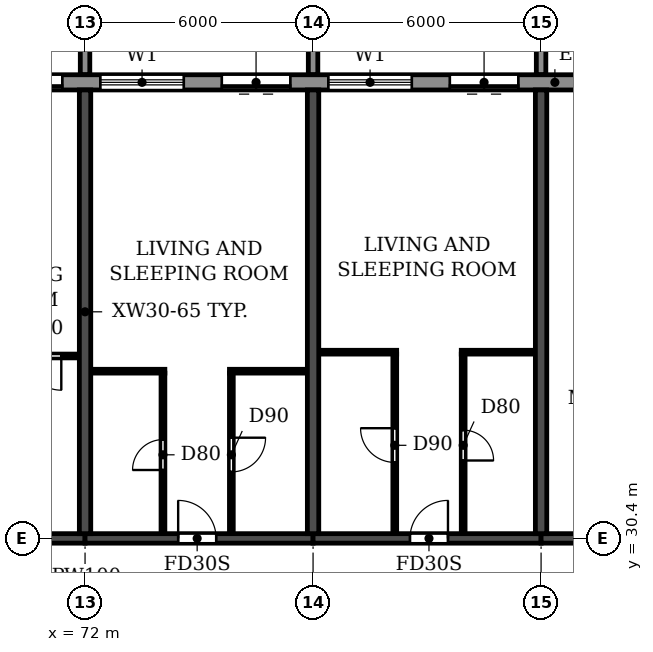
"""IFC4 building model, lengths in metres.
Left out: names, types, materials, properties, quantities, classifications, styles, units other than length and angle.
Written with IfcOpenShell. Run it as: python <this file> out.ifc"""

import sys

from ifc_helpers import new_model, si_unit, direction, frame, frame_2d, origin, place, context, subcontext, project, spatial, polyline, rectangle, outline, extrude, source, transform, mapped, element, fill, save


model = new_model("IFC4")
c1 = context("Model", 3, precision=1e-05, world=origin(), true_north=direction((0.0, 1.0)))
c2 = subcontext(c1, "Body", "Model", "MODEL_VIEW")
j1 = project(units=[si_unit("LENGTHUNIT", "METRE"), si_unit("PLANEANGLEUNIT", "RADIAN")], contexts=[c1])
p1 = place(None, origin())
s1 = spatial("IfcSite", under=j1, at=p1, CompositionType="ELEMENT")
p2 = place(p1, origin())
s2 = spatial("IfcBuilding", under=s1, at=p2, CompositionType="ELEMENT")
p3 = place(p2, frame((0.0, 0.0, 132.3)))
s3 = spatial("IfcBuildingStorey", under=s2, at=p3, CompositionType="ELEMENT", Elevation=132.3)
for number, where, z_axis, x_axis in (
    (1, (72.0, 30.525, 0.0), (0.0, 0.0, 1.0), (0.0, 1.0, 0.0)),
    (2, (78.0, 30.525, 0.0), (0.0, 0.0, 1.0), (0.0, 1.0, 0.0)),
    (3, (84.0, 30.525, 0.0), (0.0, 0.0, 1.0), (0.0, 1.0, 0.0)),
):
    element("IfcWall", number, at=place(p3, frame(where, z_axis=z_axis, x_axis=x_axis)), inside=s3, PredefinedType="SHEAR", context=c2, shape_type="SweptSolid", body=[
        extrude(rectangle(XDim=11.675, YDim=0.3, at=frame_2d((5.837, 0.0))), origin(), (0.0, 0.0, 1.0), 3.07),
    ])
p4 = place(p3, frame((66.0, 30.4, 0.0), z_axis=(0.0, 0.0, 1.0), x_axis=(1.0, 0.0, 0.0)))
e4 = element("IfcWall", 4, at=p4, inside=s3, PredefinedType="SHEAR", context=c2, shape_type="SweptSolid", body=[
    extrude(rectangle(XDim=6.0, YDim=0.25, at=frame_2d((3.0, 0.0))), origin(), (0.0, 0.0, 1.0), 2.47),
])
p5 = place(p4, frame((2.45, 0.0, 0.0)))
e5 = element("IfcOpeningElement", 5, at=p5, cuts=e4, PredefinedType="OPENING", context=c2, shape_type="SweptSolid", body=[
    extrude(rectangle(XDim=1.0, YDim=2.1, at=frame_2d((0.5, 1.05))), frame((0.0, 0.135, 0.0), z_axis=(0.0, -1.0, 0.0), x_axis=(1.0, 0.0, 0.0)), (0.0, 0.0, 1.0), 0.27),
])
p6 = place(p3, frame((72.0, 30.4, 0.0), z_axis=(0.0, 0.0, 1.0), x_axis=(1.0, 0.0, 0.0)))
e6 = element("IfcWall", 6, at=p6, inside=s3, PredefinedType="SHEAR", context=c2, shape_type="SweptSolid", body=[
    extrude(rectangle(XDim=6.0, YDim=0.25, at=frame_2d((3.0, 0.0))), origin(), (0.0, 0.0, 1.0), 2.47),
])
p7 = place(p6, frame((2.45, 0.0, 0.0)))
e7 = element("IfcOpeningElement", 7, at=p7, cuts=e6, PredefinedType="OPENING", context=c2, shape_type="SweptSolid", body=[
    extrude(rectangle(XDim=1.0, YDim=2.1, at=frame_2d((0.5, 1.05))), frame((0.0, 0.135, 0.0), z_axis=(0.0, -1.0, 0.0), x_axis=(1.0, 0.0, 0.0)), (0.0, 0.0, 1.0), 0.27),
])
p8 = place(p3, frame((78.0, 30.4, 0.0), z_axis=(0.0, 0.0, 1.0), x_axis=(1.0, 0.0, 0.0)))
e8 = element("IfcWall", 8, at=p8, inside=s3, PredefinedType="SHEAR", context=c2, shape_type="SweptSolid", body=[
    extrude(rectangle(XDim=6.0, YDim=0.25, at=frame_2d((3.0, 0.0))), origin(), (0.0, 0.0, 1.0), 2.47),
])
p9 = place(p8, frame((2.55, 0.0, 0.0)))
e9 = element("IfcOpeningElement", 9, at=p9, cuts=e8, PredefinedType="OPENING", context=c2, shape_type="SweptSolid", body=[
    extrude(rectangle(XDim=1.0, YDim=2.1, at=frame_2d((0.5, 1.05))), frame((0.0, 0.135, 0.0), z_axis=(0.0, -1.0, 0.0), x_axis=(1.0, 0.0, 0.0)), (0.0, 0.0, 1.0), 0.27),
])
p10 = place(p3, frame((84.0, 30.4, 0.0), z_axis=(0.0, 0.0, 1.0), x_axis=(1.0, 0.0, 0.0)))
e10 = element("IfcWall", 10, at=p10, inside=s3, PredefinedType="SHEAR", context=c2, shape_type="SweptSolid", body=[
    extrude(rectangle(XDim=5.8, YDim=0.25, at=frame_2d((2.9, 0.0))), origin(), (0.0, 0.0, 1.0), 2.47),
])
p11 = place(p10, frame((2.5, 0.0, 0.0)))
e11 = element("IfcOpeningElement", 11, at=p11, cuts=e10, PredefinedType="OPENING", context=c2, shape_type="SweptSolid", body=[
    extrude(rectangle(XDim=1.0, YDim=2.1, at=frame_2d((0.5, 1.05))), frame((0.0, 0.135, 0.0), z_axis=(0.0, -1.0, 0.0), x_axis=(1.0, 0.0, 0.0)), (0.0, 0.0, 1.0), 0.27),
])
p12 = place(p3, frame((85.317, 42.4, 0.0), z_axis=(0.0, 0.0, 1.0), x_axis=(-1.0, 0.0, 0.0)))
e12 = element("IfcWall", 12, at=p12, inside=s3, PredefinedType="STANDARD", context=c2, shape_type="SweptSolid", body=[
    extrude(rectangle(XDim=68.634, YDim=0.4, at=frame_2d((34.317, 0.0))), origin(), (0.0, 0.0, 1.0), 3.07),
])
p13 = place(p12, frame((64.917, 0.0, 0.0)))
e13 = element("IfcOpeningElement", 13, at=p13, cuts=e12, PredefinedType="OPENING", context=c2, shape_type="SweptSolid", body=[
    extrude(rectangle(XDim=1.8, YDim=2.4, at=frame_2d((0.9, 1.2))), frame((0.0, 0.21, 0.0), z_axis=(0.0, -1.0, 0.0), x_axis=(1.0, 0.0, 0.0)), (0.0, 0.0, 1.0), 0.42),
])
p14 = place(p12, frame((61.717, 0.0, 0.9)))
e14 = element("IfcOpeningElement", 14, at=p14, cuts=e12, PredefinedType="OPENING", context=c2, shape_type="SweptSolid", body=[
    extrude(rectangle(XDim=2.2, YDim=1.5, at=frame_2d((1.1, 0.75))), frame((0.0, 0.21, 0.0), z_axis=(0.0, -1.0, 0.0), x_axis=(1.0, 0.0, 0.0)), (0.0, 0.0, 1.0), 0.42),
])
p15 = place(p12, frame((58.717, 0.0, 0.9)))
e15 = element("IfcOpeningElement", 15, at=p15, cuts=e12, PredefinedType="OPENING", context=c2, shape_type="SweptSolid", body=[
    extrude(rectangle(XDim=2.2, YDim=1.5, at=frame_2d((1.1, 0.75))), frame((0.0, 0.21, 0.0), z_axis=(0.0, -1.0, 0.0), x_axis=(1.0, 0.0, 0.0)), (0.0, 0.0, 1.0), 0.42),
])
p16 = place(p12, frame((55.717, 0.0, 0.9)))
e16 = element("IfcOpeningElement", 16, at=p16, cuts=e12, PredefinedType="OPENING", context=c2, shape_type="SweptSolid", body=[
    extrude(rectangle(XDim=2.2, YDim=1.5, at=frame_2d((1.1, 0.75))), frame((0.0, 0.21, 0.0), z_axis=(0.0, -1.0, 0.0), x_axis=(1.0, 0.0, 0.0)), (0.0, 0.0, 1.0), 0.42),
])
p17 = place(p12, frame((52.917, 0.0, 0.0)))
e17 = element("IfcOpeningElement", 17, at=p17, cuts=e12, PredefinedType="OPENING", context=c2, shape_type="SweptSolid", body=[
    extrude(rectangle(XDim=1.8, YDim=2.4, at=frame_2d((0.9, 1.2))), frame((0.0, 0.21, 0.0), z_axis=(0.0, -1.0, 0.0), x_axis=(1.0, 0.0, 0.0)), (0.0, 0.0, 1.0), 0.42),
])
p18 = place(p12, frame((49.717, 0.0, 0.9)))
e18 = element("IfcOpeningElement", 18, at=p18, cuts=e12, PredefinedType="OPENING", context=c2, shape_type="SweptSolid", body=[
    extrude(rectangle(XDim=2.2, YDim=1.5, at=frame_2d((1.1, 0.75))), frame((0.0, 0.21, 0.0), z_axis=(0.0, -1.0, 0.0), x_axis=(1.0, 0.0, 0.0)), (0.0, 0.0, 1.0), 0.42),
])
p19 = place(p12, frame((46.717, 0.0, 0.9)))
e19 = element("IfcOpeningElement", 19, at=p19, cuts=e12, PredefinedType="OPENING", context=c2, shape_type="SweptSolid", body=[
    extrude(rectangle(XDim=2.2, YDim=1.5, at=frame_2d((1.1, 0.75))), frame((0.0, 0.21, 0.0), z_axis=(0.0, -1.0, 0.0), x_axis=(1.0, 0.0, 0.0)), (0.0, 0.0, 1.0), 0.42),
])
p20 = place(p12, frame((43.917, 0.0, 0.0)))
e20 = element("IfcOpeningElement", 20, at=p20, cuts=e12, PredefinedType="OPENING", context=c2, shape_type="SweptSolid", body=[
    extrude(rectangle(XDim=1.8, YDim=2.4, at=frame_2d((0.9, 1.2))), frame((0.0, 0.21, 0.0), z_axis=(0.0, -1.0, 0.0), x_axis=(1.0, 0.0, 0.0)), (0.0, 0.0, 1.0), 0.42),
])
p21 = place(p12, frame((40.917, 0.0, 0.0)))
e21 = element("IfcOpeningElement", 21, at=p21, cuts=e12, PredefinedType="OPENING", context=c2, shape_type="SweptSolid", body=[
    extrude(rectangle(XDim=1.8, YDim=2.4, at=frame_2d((0.9, 1.2))), frame((0.0, 0.21, 0.0), z_axis=(0.0, -1.0, 0.0), x_axis=(1.0, 0.0, 0.0)), (0.0, 0.0, 1.0), 0.42),
])
p22 = place(p12, frame((37.717, 0.0, 0.9)))
e22 = element("IfcOpeningElement", 22, at=p22, cuts=e12, PredefinedType="OPENING", context=c2, shape_type="SweptSolid", body=[
    extrude(rectangle(XDim=2.2, YDim=1.5, at=frame_2d((1.1, 0.75))), frame((0.0, 0.21, 0.0), z_axis=(0.0, -1.0, 0.0), x_axis=(1.0, 0.0, 0.0)), (0.0, 0.0, 1.0), 0.42),
])
p23 = place(p12, frame((34.717, 0.0, 0.9)))
e23 = element("IfcOpeningElement", 23, at=p23, cuts=e12, PredefinedType="OPENING", context=c2, shape_type="SweptSolid", body=[
    extrude(rectangle(XDim=2.2, YDim=1.5, at=frame_2d((1.1, 0.75))), frame((0.0, 0.21, 0.0), z_axis=(0.0, -1.0, 0.0), x_axis=(1.0, 0.0, 0.0)), (0.0, 0.0, 1.0), 0.42),
])
p24 = place(p12, frame((31.717, 0.0, 0.9)))
e24 = element("IfcOpeningElement", 24, at=p24, cuts=e12, PredefinedType="OPENING", context=c2, shape_type="SweptSolid", body=[
    extrude(rectangle(XDim=2.2, YDim=1.5, at=frame_2d((1.1, 0.75))), frame((0.0, 0.21, 0.0), z_axis=(0.0, -1.0, 0.0), x_axis=(1.0, 0.0, 0.0)), (0.0, 0.0, 1.0), 0.42),
])
p25 = place(p12, frame((28.917, 0.0, 0.0)))
e25 = element("IfcOpeningElement", 25, at=p25, cuts=e12, PredefinedType="OPENING", context=c2, shape_type="SweptSolid", body=[
    extrude(rectangle(XDim=1.8, YDim=2.4, at=frame_2d((0.9, 1.2))), frame((0.0, 0.21, 0.0), z_axis=(0.0, -1.0, 0.0), x_axis=(1.0, 0.0, 0.0)), (0.0, 0.0, 1.0), 0.42),
])
p26 = place(p12, frame((25.717, 0.0, 0.9)))
e26 = element("IfcOpeningElement", 26, at=p26, cuts=e12, PredefinedType="OPENING", context=c2, shape_type="SweptSolid", body=[
    extrude(rectangle(XDim=2.2, YDim=1.5, at=frame_2d((1.1, 0.75))), frame((0.0, 0.21, 0.0), z_axis=(0.0, -1.0, 0.0), x_axis=(1.0, 0.0, 0.0)), (0.0, 0.0, 1.0), 0.42),
])
p27 = place(p12, frame((22.717, 0.0, 0.9)))
e27 = element("IfcOpeningElement", 27, at=p27, cuts=e12, PredefinedType="OPENING", context=c2, shape_type="SweptSolid", body=[
    extrude(rectangle(XDim=2.2, YDim=1.5, at=frame_2d((1.1, 0.75))), frame((0.0, 0.21, 0.0), z_axis=(0.0, -1.0, 0.0), x_axis=(1.0, 0.0, 0.0)), (0.0, 0.0, 1.0), 0.42),
])
p28 = place(p12, frame((19.717, 0.0, 0.9)))
e28 = element("IfcOpeningElement", 28, at=p28, cuts=e12, PredefinedType="OPENING", context=c2, shape_type="SweptSolid", body=[
    extrude(rectangle(XDim=2.2, YDim=1.5, at=frame_2d((1.1, 0.75))), frame((0.0, 0.21, 0.0), z_axis=(0.0, -1.0, 0.0), x_axis=(1.0, 0.0, 0.0)), (0.0, 0.0, 1.0), 0.42),
])
p29 = place(p12, frame((16.717, 0.0, 0.9)))
e29 = element("IfcOpeningElement", 29, at=p29, cuts=e12, PredefinedType="OPENING", context=c2, shape_type="SweptSolid", body=[
    extrude(rectangle(XDim=2.2, YDim=1.5, at=frame_2d((1.1, 0.75))), frame((0.0, 0.21, 0.0), z_axis=(0.0, -1.0, 0.0), x_axis=(1.0, 0.0, 0.0)), (0.0, 0.0, 1.0), 0.42),
])
p30 = place(p12, frame((13.917, 0.0, 0.0)))
e30 = element("IfcOpeningElement", 30, at=p30, cuts=e12, PredefinedType="OPENING", context=c2, shape_type="SweptSolid", body=[
    extrude(rectangle(XDim=1.8, YDim=2.4, at=frame_2d((0.9, 1.2))), frame((0.0, 0.21, 0.0), z_axis=(0.0, -1.0, 0.0), x_axis=(1.0, 0.0, 0.0)), (0.0, 0.0, 1.0), 0.42),
])
p31 = place(p12, frame((10.717, 0.0, 0.9)))
e31 = element("IfcOpeningElement", 31, at=p31, cuts=e12, PredefinedType="OPENING", context=c2, shape_type="SweptSolid", body=[
    extrude(rectangle(XDim=2.2, YDim=1.5, at=frame_2d((1.1, 0.75))), frame((0.0, 0.21, 0.0), z_axis=(0.0, -1.0, 0.0), x_axis=(1.0, 0.0, 0.0)), (0.0, 0.0, 1.0), 0.42),
])
p32 = place(p12, frame((7.917, 0.0, 0.0)))
e32 = element("IfcOpeningElement", 32, at=p32, cuts=e12, PredefinedType="OPENING", context=c2, shape_type="SweptSolid", body=[
    extrude(rectangle(XDim=1.8, YDim=2.4, at=frame_2d((0.9, 1.2))), frame((0.0, 0.21, 0.0), z_axis=(0.0, -1.0, 0.0), x_axis=(1.0, 0.0, 0.0)), (0.0, 0.0, 1.0), 0.42),
])
p33 = place(p12, frame((4.717, 0.0, 0.9)))
e33 = element("IfcOpeningElement", 33, at=p33, cuts=e12, PredefinedType="OPENING", context=c2, shape_type="SweptSolid", body=[
    extrude(rectangle(XDim=2.2, YDim=1.5, at=frame_2d((1.1, 0.75))), frame((0.0, 0.21, 0.0), z_axis=(0.0, -1.0, 0.0), x_axis=(1.0, 0.0, 0.0)), (0.0, 0.0, 1.0), 0.42),
])
p34 = place(p12, frame((1.917, 0.0, 0.0)))
e34 = element("IfcOpeningElement", 34, at=p34, cuts=e12, PredefinedType="OPENING", context=c2, shape_type="SweptSolid", body=[
    extrude(rectangle(XDim=1.8, YDim=2.4, at=frame_2d((0.9, 1.2))), frame((0.0, 0.21, 0.0), z_axis=(0.0, -1.0, 0.0), x_axis=(1.0, 0.0, 0.0)), (0.0, 0.0, 1.0), 0.42),
])
m1 = source(origin(), c2, "Body", "SweptSolid", [
    extrude(outline(polyline([(0.0, 0.0), (0.25, 0.0), (0.25, 3.1), (0.0, 3.1), (0.0, 0.0)])), origin(), (0.0, 0.0, 1.0), 3.1),
])
for number, where in (
    (35, (71.875, 42.6, 0.0)),
    (36, (77.875, 42.6, 0.0)),
    (37, (83.875, 42.6, 0.0)),
):
    element("IfcWall", number, at=place(p3, frame(where)), inside=s3, PredefinedType="STANDARD", context=c2, shape_type="MappedRepresentation", body=[
        mapped(m1, transform((0.0, 0.0, 0.0))),
    ])
p35 = place(p3, frame((72.16, 34.8, 0.0), z_axis=(0.0, 0.0, 1.0), x_axis=(1.0, 0.0, 0.0)))
e38 = element("IfcWall", 38, at=p35, inside=s3, PredefinedType="PARTITIONING", context=c2, shape_type="SweptSolid", body=[
    extrude(rectangle(XDim=1.94, YDim=0.1, at=frame_2d((0.97, 0.0))), origin(), (0.0, 0.0, 1.0), 3.07),
])
p36 = place(p3, frame((75.8, 34.8, 0.0), z_axis=(0.0, 0.0, 1.0), x_axis=(1.0, 0.0, 0.0)))
e39 = element("IfcWall", 39, at=p36, inside=s3, PredefinedType="PARTITIONING", context=c2, shape_type="SweptSolid", body=[
    extrude(rectangle(XDim=2.04, YDim=0.1, at=frame_2d((1.02, 0.0))), origin(), (0.0, 0.0, 1.0), 3.07),
])
p37 = place(p3, frame((69.8, 35.2, 0.0), z_axis=(0.0, 0.0, 1.0), x_axis=(1.0, 0.0, 0.0)))
e40 = element("IfcWall", 40, at=p37, inside=s3, PredefinedType="PARTITIONING", context=c2, shape_type="SweptSolid", body=[
    extrude(rectangle(XDim=2.04, YDim=0.1, at=frame_2d((1.02, 0.0))), origin(), (0.0, 0.0, 1.0), 3.07),
])
p38 = place(p37, frame((0.675, 0.0, 0.0)))
e41 = element("IfcOpeningElement", 41, at=p38, cuts=e40, PredefinedType="OPENING", context=c2, shape_type="SweptSolid", body=[
    extrude(rectangle(XDim=0.9, YDim=2.1, at=frame_2d((0.45, 1.05))), frame((0.0, 0.06, 0.0), z_axis=(0.0, -1.0, 0.0), x_axis=(1.0, 0.0, 0.0)), (0.0, 0.0, 1.0), 0.12),
])
p39 = place(p3, frame((78.16, 35.3, 0.0), z_axis=(0.0, 0.0, 1.0), x_axis=(1.0, 0.0, 0.0)))
e42 = element("IfcWall", 42, at=p39, inside=s3, PredefinedType="PARTITIONING", context=c2, shape_type="SweptSolid", body=[
    extrude(rectangle(XDim=2.04, YDim=0.1, at=frame_2d((1.02, 0.0))), origin(), (0.0, 0.0, 1.0), 3.07),
])
p40 = place(p3, frame((81.9, 35.3, 0.0), z_axis=(0.0, 0.0, 1.0), x_axis=(1.0, 0.0, 0.0)))
e43 = element("IfcWall", 43, at=p40, inside=s3, PredefinedType="PARTITIONING", context=c2, shape_type="SweptSolid", body=[
    extrude(rectangle(XDim=1.94, YDim=0.1, at=frame_2d((0.97, 0.0))), origin(), (0.0, 0.0, 1.0), 3.07),
])
p41 = place(p3, frame((74.05, 30.535, 0.0), z_axis=(0.0, 0.0, 1.0), x_axis=(0.0, 1.0, 0.0)))
e44 = element("IfcWall", 44, at=p41, inside=s3, PredefinedType="PARTITIONING", context=c2, shape_type="SweptSolid", body=[
    extrude(rectangle(XDim=4.215, YDim=0.1, at=frame_2d((2.107, 0.0))), origin(), (0.0, 0.0, 1.0), 3.07),
])
p42 = place(p41, frame((1.665, 0.0, 0.0)))
e45 = element("IfcOpeningElement", 45, at=p42, cuts=e44, PredefinedType="OPENING", context=c2, shape_type="SweptSolid", body=[
    extrude(rectangle(XDim=0.8, YDim=2.1, at=frame_2d((0.4, 1.05))), frame((0.0, 0.06, 0.0), z_axis=(0.0, -1.0, 0.0), x_axis=(1.0, 0.0, 0.0)), (0.0, 0.0, 1.0), 0.12),
])
p43 = place(p3, frame((75.85, 30.535, 0.0), z_axis=(0.0, 0.0, 1.0), x_axis=(0.0, 1.0, 0.0)))
e46 = element("IfcWall", 46, at=p43, inside=s3, PredefinedType="PARTITIONING", context=c2, shape_type="SweptSolid", body=[
    extrude(rectangle(XDim=4.215, YDim=0.1, at=frame_2d((2.107, 0.0))), origin(), (0.0, 0.0, 1.0), 3.07),
])
p44 = place(p43, frame((1.615, 0.0, 0.0)))
e47 = element("IfcOpeningElement", 47, at=p44, cuts=e46, PredefinedType="OPENING", context=c2, shape_type="SweptSolid", body=[
    extrude(rectangle(XDim=0.9, YDim=2.1, at=frame_2d((0.45, 1.05))), frame((0.0, 0.06, 0.0), z_axis=(0.0, -1.0, 0.0), x_axis=(1.0, 0.0, 0.0)), (0.0, 0.0, 1.0), 0.12),
])
p45 = place(p3, frame((80.15, 30.535, 0.0), z_axis=(0.0, 0.0, 1.0), x_axis=(0.0, 1.0, 0.0)))
e48 = element("IfcWall", 48, at=p45, inside=s3, PredefinedType="PARTITIONING", context=c2, shape_type="SweptSolid", body=[
    extrude(rectangle(XDim=4.715, YDim=0.1, at=frame_2d((2.357, 0.0))), origin(), (0.0, 0.0, 1.0), 3.07),
])
p46 = place(p45, frame((1.865, 0.0, 0.0)))
e49 = element("IfcOpeningElement", 49, at=p46, cuts=e48, PredefinedType="OPENING", context=c2, shape_type="SweptSolid", body=[
    extrude(rectangle(XDim=0.9, YDim=2.1, at=frame_2d((0.45, 1.05))), frame((0.0, 0.06, 0.0), z_axis=(0.0, -1.0, 0.0), x_axis=(1.0, 0.0, 0.0)), (0.0, 0.0, 1.0), 0.12),
])
p47 = place(p3, frame((81.95, 30.535, 0.0), z_axis=(0.0, 0.0, 1.0), x_axis=(0.0, 1.0, 0.0)))
e50 = element("IfcWall", 50, at=p47, inside=s3, PredefinedType="PARTITIONING", context=c2, shape_type="SweptSolid", body=[
    extrude(rectangle(XDim=4.715, YDim=0.1, at=frame_2d((2.357, 0.0))), origin(), (0.0, 0.0, 1.0), 3.07),
])
p48 = place(p47, frame((1.915, 0.0, 0.0)))
e51 = element("IfcOpeningElement", 51, at=p48, cuts=e50, PredefinedType="OPENING", context=c2, shape_type="SweptSolid", body=[
    extrude(rectangle(XDim=0.8, YDim=2.1, at=frame_2d((0.4, 1.05))), frame((0.0, 0.06, 0.0), z_axis=(0.0, -1.0, 0.0), x_axis=(1.0, 0.0, 0.0)), (0.0, 0.0, 1.0), 0.12),
])
p49 = place(p30, origin())
e52 = element("IfcDoor", 52, at=p49, inside=s3, OperationType="DOUBLE_DOOR_SLIDING", PredefinedType="DOOR", context=c2, shape_type="SweptSolid", body=[
    extrude(rectangle(XDim=1.8, YDim=2.4, at=frame_2d((0.9, 1.2))), frame((0.0, 0.025, 0.0), z_axis=(0.0, -1.0, 0.0), x_axis=(1.0, 0.0, 0.0)), (0.0, 0.0, 1.0), 0.05),
])
fill(e30, e52)
p50 = place(p31, origin())
e53 = element("IfcWindow", 53, at=p50, inside=s3, PartitioningType="DOUBLE_PANEL_HORIZONTAL", PredefinedType="WINDOW", context=c2, shape_type="SweptSolid", body=[
    extrude(rectangle(XDim=2.2, YDim=1.5, at=frame_2d((1.1, 0.75))), frame((0.0, 0.03, 0.0), z_axis=(0.0, -1.0, 0.0), x_axis=(1.0, 0.0, 0.0)), (0.0, 0.0, 1.0), 0.06),
])
fill(e31, e53)
p51 = place(p32, origin())
e54 = element("IfcDoor", 54, at=p51, inside=s3, OperationType="DOUBLE_DOOR_SLIDING", PredefinedType="DOOR", context=c2, shape_type="SweptSolid", body=[
    extrude(rectangle(XDim=1.8, YDim=2.4, at=frame_2d((0.9, 1.2))), frame((0.0, 0.025, 0.0), z_axis=(0.0, -1.0, 0.0), x_axis=(1.0, 0.0, 0.0)), (0.0, 0.0, 1.0), 0.05),
])
fill(e32, e54)
p52 = place(p33, origin())
e55 = element("IfcWindow", 55, at=p52, inside=s3, PartitioningType="DOUBLE_PANEL_HORIZONTAL", PredefinedType="WINDOW", context=c2, shape_type="SweptSolid", body=[
    extrude(rectangle(XDim=2.2, YDim=1.5, at=frame_2d((1.1, 0.75))), frame((0.0, 0.03, 0.0), z_axis=(0.0, -1.0, 0.0), x_axis=(1.0, 0.0, 0.0)), (0.0, 0.0, 1.0), 0.06),
])
fill(e33, e55)
p53 = place(p34, origin())
e56 = element("IfcDoor", 56, at=p53, inside=s3, OperationType="DOUBLE_DOOR_SLIDING", PredefinedType="DOOR", context=c2, shape_type="SweptSolid", body=[
    extrude(rectangle(XDim=1.8, YDim=2.4, at=frame_2d((0.9, 1.2))), frame((0.0, 0.025, 0.0), z_axis=(0.0, -1.0, 0.0), x_axis=(1.0, 0.0, 0.0)), (0.0, 0.0, 1.0), 0.05),
])
fill(e34, e56)
p54 = place(p38, frame((0.9, 0.0, 0.0), z_axis=(0.0, 0.0, 1.0), x_axis=(-1.0, 0.0, 0.0)))
e57 = element("IfcDoor", 57, at=p54, inside=s3, OperationType="SINGLE_SWING_LEFT", PredefinedType="DOOR", context=c2, shape_type="SweptSolid", body=[
    extrude(rectangle(XDim=0.9, YDim=2.1, at=frame_2d((0.45, 1.05))), frame((0.0, 0.025, 0.0), z_axis=(0.0, -1.0, 0.0), x_axis=(1.0, 0.0, 0.0)), (0.0, 0.0, 1.0), 0.05),
])
fill(e41, e57)
p55 = place(p42, origin())
e58 = element("IfcDoor", 58, at=p55, inside=s3, OperationType="SINGLE_SWING_LEFT", PredefinedType="DOOR", context=c2, shape_type="SweptSolid", body=[
    extrude(rectangle(XDim=0.8, YDim=2.1, at=frame_2d((0.4, 1.05))), frame((0.0, 0.025, 0.0), z_axis=(0.0, -1.0, 0.0), x_axis=(1.0, 0.0, 0.0)), (0.0, 0.0, 1.0), 0.05),
])
fill(e45, e58)
p56 = place(p7, origin())
e59 = element("IfcDoor", 59, at=p56, inside=s3, OperationType="SINGLE_SWING_LEFT", PredefinedType="DOOR", context=c2, shape_type="SweptSolid", body=[
    extrude(rectangle(XDim=1.0, YDim=2.1, at=frame_2d((0.5, 1.05))), frame((0.0, 0.025, 0.0), z_axis=(0.0, -1.0, 0.0), x_axis=(1.0, 0.0, 0.0)), (0.0, 0.0, 1.0), 0.05),
])
fill(e7, e59)
p57 = place(p44, frame((0.9, 0.0, 0.0), z_axis=(0.0, 0.0, 1.0), x_axis=(-1.0, 0.0, 0.0)))
e60 = element("IfcDoor", 60, at=p57, inside=s3, OperationType="SINGLE_SWING_LEFT", PredefinedType="DOOR", context=c2, shape_type="SweptSolid", body=[
    extrude(rectangle(XDim=0.9, YDim=2.1, at=frame_2d((0.45, 1.05))), frame((0.0, 0.025, 0.0), z_axis=(0.0, -1.0, 0.0), x_axis=(1.0, 0.0, 0.0)), (0.0, 0.0, 1.0), 0.05),
])
fill(e47, e60)
p58 = place(p46, origin())
e61 = element("IfcDoor", 61, at=p58, inside=s3, OperationType="SINGLE_SWING_RIGHT", PredefinedType="DOOR", context=c2, shape_type="SweptSolid", body=[
    extrude(rectangle(XDim=0.9, YDim=2.1, at=frame_2d((0.45, 1.05))), frame((0.0, 0.025, 0.0), z_axis=(0.0, -1.0, 0.0), x_axis=(1.0, 0.0, 0.0)), (0.0, 0.0, 1.0), 0.05),
])
fill(e49, e61)
p59 = place(p9, origin())
e62 = element("IfcDoor", 62, at=p59, inside=s3, OperationType="SINGLE_SWING_RIGHT", PredefinedType="DOOR", context=c2, shape_type="SweptSolid", body=[
    extrude(rectangle(XDim=1.0, YDim=2.1, at=frame_2d((0.5, 1.05))), frame((0.0, 0.025, 0.0), z_axis=(0.0, -1.0, 0.0), x_axis=(1.0, 0.0, 0.0)), (0.0, 0.0, 1.0), 0.05),
])
fill(e9, e62)
p60 = place(p48, frame((0.8, 0.0, 0.0), z_axis=(0.0, 0.0, 1.0), x_axis=(-1.0, 0.0, 0.0)))
e63 = element("IfcDoor", 63, at=p60, inside=s3, OperationType="SINGLE_SWING_RIGHT", PredefinedType="DOOR", context=c2, shape_type="SweptSolid", body=[
    extrude(rectangle(XDim=0.8, YDim=2.1, at=frame_2d((0.4, 1.05))), frame((0.0, 0.025, 0.0), z_axis=(0.0, -1.0, 0.0), x_axis=(1.0, 0.0, 0.0)), (0.0, 0.0, 1.0), 0.05),
])
fill(e51, e63)
save(model, sys.argv[1])
